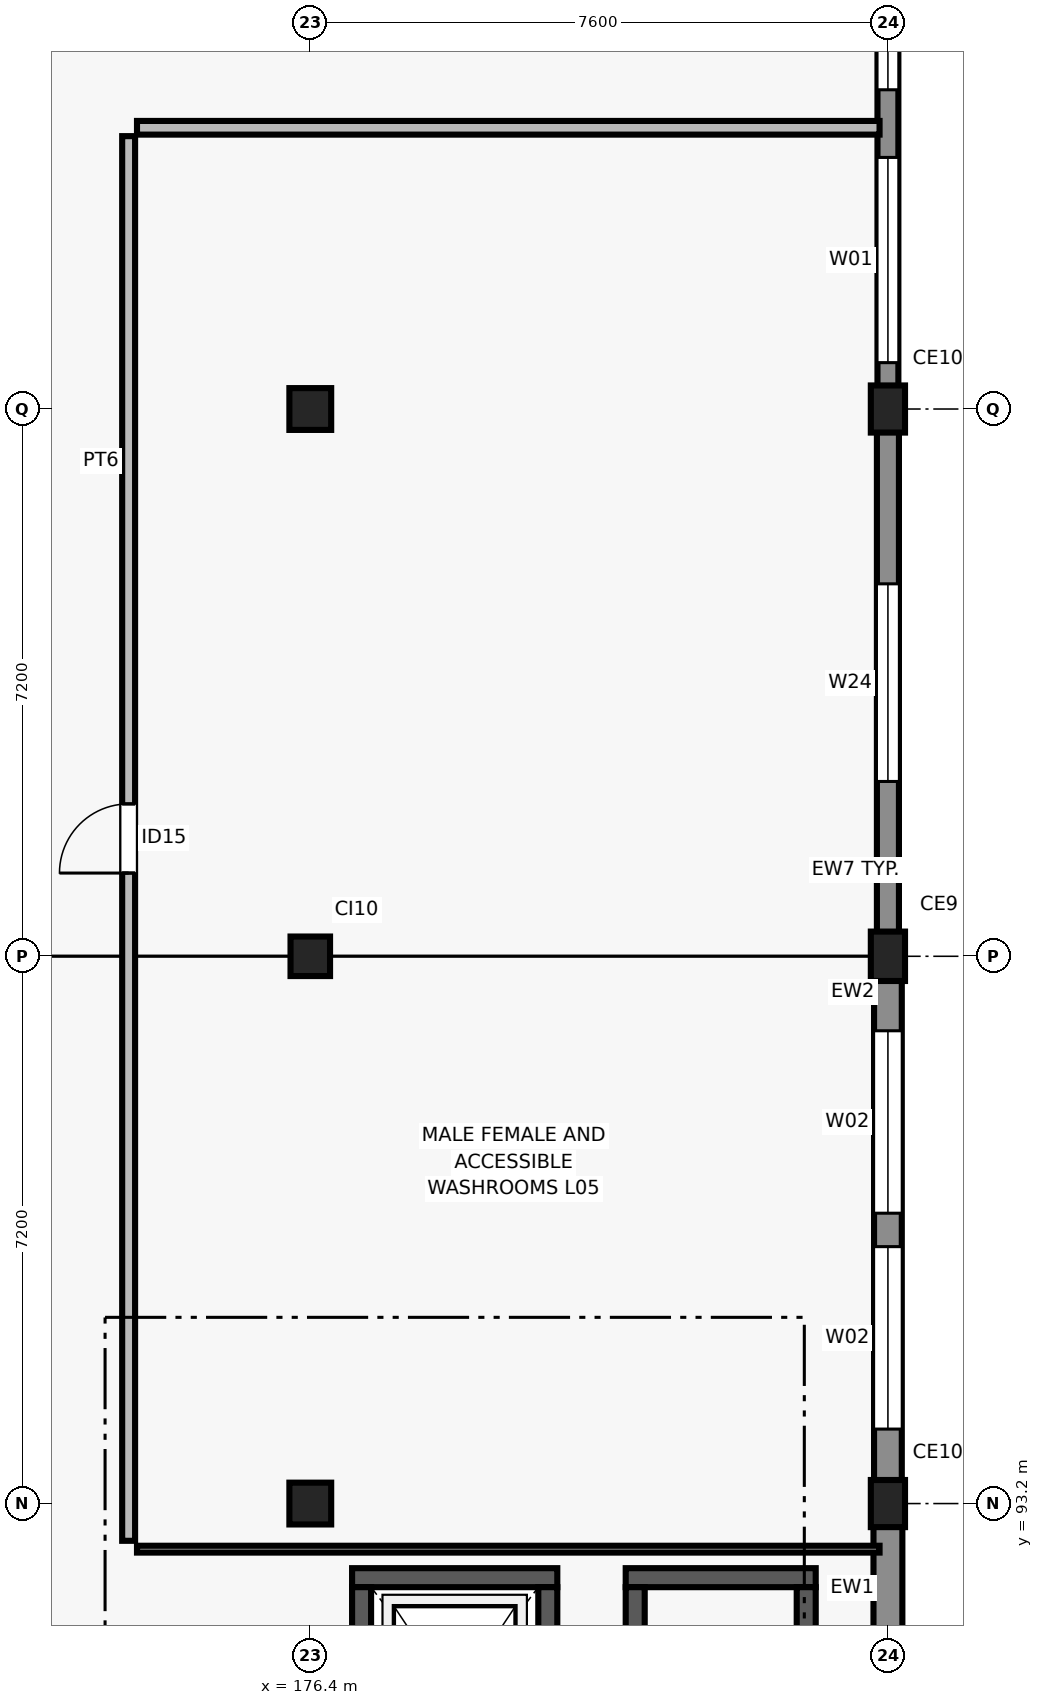
"""IFC4 building model, lengths in metres.
Left out: names, types, materials, properties, quantities, classifications, styles, units other than length and angle.
Written with IfcOpenShell. Run it as: python <this file> out.ifc"""

import sys

from ifc_helpers import new_model, si_unit, direction, frame, frame_2d, origin, origin_2d, place, context, subcontext, project, spatial, rectangle, extrude, element, fill, save


model = new_model("IFC4")
c1 = context("Model", 3, precision=1e-05, world=origin(), true_north=direction((0.0, 1.0)))
c2 = subcontext(c1, "Body", "Model", "MODEL_VIEW")
j1 = project(units=[si_unit("LENGTHUNIT", "METRE"), si_unit("PLANEANGLEUNIT", "RADIAN")], contexts=[c1])
p1 = place(None, origin())
s1 = spatial("IfcSite", under=j1, at=p1, CompositionType="ELEMENT")
p2 = place(p1, origin())
s2 = spatial("IfcBuilding", under=s1, at=p2, CompositionType="ELEMENT")
p3 = place(p2, frame((0.0, 0.0, 21.6)))
s3 = spatial("IfcBuildingStorey", under=s2, at=p3, CompositionType="ELEMENT", Elevation=21.6)
p4 = place(p3, frame((176.4, 93.2, 0.0), z_axis=(0.0, 0.0, 1.0), x_axis=(1.0, 0.0, 0.0)))
e1 = element("IfcColumn", 1, at=p4, inside=s3, PredefinedType="COLUMN", context=c2, shape_type="SweptSolid", body=[
    extrude(rectangle(XDim=0.55, YDim=0.55, at=origin_2d()), origin(), (0.0, 0.0, 1.0), 4.2),
])
p5 = place(p3, frame((176.4, 100.4, 0.0), z_axis=(0.0, 0.0, 1.0), x_axis=(1.0, 0.0, 0.0)))
e2 = element("IfcColumn", 2, at=p5, inside=s3, PredefinedType="COLUMN", context=c2, shape_type="SweptSolid", body=[
    extrude(rectangle(XDim=0.52, YDim=0.52, at=origin_2d()), origin(), (0.0, 0.0, 1.0), 4.2),
])
p6 = place(p3, frame((176.4, 107.6, 0.0), z_axis=(0.0, 0.0, 1.0), x_axis=(1.0, 0.0, 0.0)))
e3 = element("IfcColumn", 3, at=p6, inside=s3, PredefinedType="COLUMN", context=c2, shape_type="SweptSolid", body=[
    extrude(rectangle(XDim=0.55, YDim=0.55, at=origin_2d()), origin(), (0.0, 0.0, 1.0), 4.2),
])
p7 = place(p3, frame((184.0, 93.2, 0.0), z_axis=(0.0, 0.0, 1.0), x_axis=(1.0, 0.0, 0.0)))
e4 = element("IfcColumn", 4, at=p7, inside=s3, PredefinedType="COLUMN", context=c2, shape_type="SweptSolid", body=[
    extrude(rectangle(XDim=0.62, YDim=0.45, at=origin_2d()), origin(), (0.0, 0.0, 1.0), 4.2),
])
p8 = place(p3, frame((184.0, 100.4, 0.0), z_axis=(0.0, 0.0, 1.0), x_axis=(1.0, 0.0, 0.0)))
e5 = element("IfcColumn", 5, at=p8, inside=s3, PredefinedType="COLUMN", context=c2, shape_type="SweptSolid", body=[
    extrude(rectangle(XDim=0.65, YDim=0.45, at=origin_2d()), origin(), (0.0, 0.0, 1.0), 4.2),
])
p9 = place(p3, frame((184.0, 107.6, 0.0), z_axis=(0.0, 0.0, 1.0), x_axis=(1.0, 0.0, 0.0)))
e6 = element("IfcColumn", 6, at=p9, inside=s3, PredefinedType="COLUMN", context=c2, shape_type="SweptSolid", body=[
    extrude(rectangle(XDim=0.62, YDim=0.45, at=origin_2d()), origin(), (0.0, 0.0, 1.0), 4.2),
])
p10 = place(p3, frame((184.0, 100.62, 0.0), z_axis=(0.0, 0.0, 1.0), x_axis=(0.0, 1.0, 0.0)))
e7 = element("IfcWall", 7, at=p10, inside=s3, PredefinedType="SOLIDWALL", context=c2, shape_type="SweptSolid", body=[
    extrude(rectangle(XDim=6.76, YDim=0.29, at=frame_2d((3.38, 0.0))), origin(), (0.0, 0.0, 1.0), 3.46),
])
p11 = place(p10, frame((2.08, 0.0, 0.9)))
e8 = element("IfcOpeningElement", 8, at=p11, cuts=e7, PredefinedType="OPENING", context=c2, shape_type="SweptSolid", body=[
    extrude(rectangle(XDim=2.6, YDim=1.65, at=frame_2d((1.3, 0.825))), frame((0.0, 0.155, 0.0), z_axis=(0.0, -1.0, 0.0), x_axis=(1.0, 0.0, 0.0)), (0.0, 0.0, 1.0), 0.31),
])
p12 = place(p3, frame((184.0, 107.82, 0.0), z_axis=(0.0, 0.0, 1.0), x_axis=(0.0, 1.0, 0.0)))
e9 = element("IfcWall", 9, at=p12, inside=s3, PredefinedType="SOLIDWALL", context=c2, shape_type="SweptSolid", body=[
    extrude(rectangle(XDim=6.76, YDim=0.275, at=frame_2d((3.38, 0.0))), origin(), (0.0, 0.0, 1.0), 3.52),
])
p13 = place(p12, frame((0.39, 0.0, 0.9)))
e10 = element("IfcOpeningElement", 10, at=p13, cuts=e9, PredefinedType="OPENING", context=c2, shape_type="SweptSolid", body=[
    extrude(rectangle(XDim=2.7, YDim=1.8, at=frame_2d((1.35, 0.9))), frame((0.0, 0.147, 0.0), z_axis=(0.0, -1.0, 0.0), x_axis=(1.0, 0.0, 0.0)), (0.0, 0.0, 1.0), 0.295),
])
p14 = place(p12, frame((3.98, 0.0, 0.9)))
e11 = element("IfcOpeningElement", 11, at=p14, cuts=e9, PredefinedType="OPENING", context=c2, shape_type="SweptSolid", body=[
    extrude(rectangle(XDim=1.8, YDim=1.8, at=frame_2d((0.9, 0.9))), frame((0.0, 0.147, 0.0), z_axis=(0.0, -1.0, 0.0), x_axis=(1.0, 0.0, 0.0)), (0.0, 0.0, 1.0), 0.295),
])
p15 = place(p3, frame((184.0, 86.22, 0.0), z_axis=(0.0, 0.0, 1.0), x_axis=(0.0, 1.0, 0.0)))
e12 = element("IfcWall", 12, at=p15, inside=s3, PredefinedType="SOLIDWALL", context=c2, shape_type="SweptSolid", body=[
    extrude(rectangle(XDim=6.76, YDim=0.38, at=frame_2d((3.38, 0.0))), origin(), (0.0, 0.0, 1.0), 3.36),
])
p16 = place(p15, frame((2.03, 0.0, 0.9)))
e13 = element("IfcOpeningElement", 13, at=p16, cuts=e12, PredefinedType="OPENING", context=c2, shape_type="SweptSolid", body=[
    extrude(rectangle(XDim=2.7, YDim=1.8, at=frame_2d((1.35, 0.9))), frame((0.0, 0.2, 0.0), z_axis=(0.0, -1.0, 0.0), x_axis=(1.0, 0.0, 0.0)), (0.0, 0.0, 1.0), 0.4),
])
p17 = place(p3, frame((184.0, 93.42, 0.0), z_axis=(0.0, 0.0, 1.0), x_axis=(0.0, 1.0, 0.0)))
e14 = element("IfcWall", 14, at=p17, inside=s3, PredefinedType="SOLIDWALL", context=c2, shape_type="SweptSolid", body=[
    extrude(rectangle(XDim=6.76, YDim=0.365, at=frame_2d((3.38, 0.0))), origin(), (0.0, 0.0, 1.0), 3.4),
])
p18 = place(p17, frame((0.76, 0.0, 0.9)))
e15 = element("IfcOpeningElement", 15, at=p18, cuts=e14, PredefinedType="OPENING", context=c2, shape_type="SweptSolid", body=[
    extrude(rectangle(XDim=2.4, YDim=1.8, at=frame_2d((1.2, 0.9))), frame((0.0, 0.192, 0.0), z_axis=(0.0, -1.0, 0.0), x_axis=(1.0, 0.0, 0.0)), (0.0, 0.0, 1.0), 0.385),
])
p19 = place(p17, frame((3.6, 0.0, 0.9)))
e16 = element("IfcOpeningElement", 16, at=p19, cuts=e14, PredefinedType="OPENING", context=c2, shape_type="SweptSolid", body=[
    extrude(rectangle(XDim=2.4, YDim=1.8, at=frame_2d((1.2, 0.9))), frame((0.0, 0.192, 0.0), z_axis=(0.0, -1.0, 0.0), x_axis=(1.0, 0.0, 0.0)), (0.0, 0.0, 1.0), 0.385),
])
p20 = place(p3, frame((176.95, 92.225, 0.0), z_axis=(0.0, 0.0, 1.0), x_axis=(1.0, 0.0, 0.0)))
e17 = element("IfcWall", 17, at=p20, inside=s3, PredefinedType="SHEAR", context=c2, shape_type="SweptSolid", body=[
    extrude(rectangle(XDim=2.7, YDim=0.25, at=frame_2d((1.35, 0.0))), origin(), (0.0, 0.0, 1.0), 3.92),
])
for number, where, z_axis, x_axis in (
    (18, (177.075, 89.2, 0.0), (0.0, 0.0, 1.0), (0.0, 1.0, 0.0)),
    (19, (179.525, 89.2, 0.0), (0.0, 0.0, 1.0), (0.0, 1.0, 0.0)),
):
    element("IfcWall", number, at=place(p3, frame(where, z_axis=z_axis, x_axis=x_axis)), inside=s3, PredefinedType="SHEAR", context=c2, shape_type="SweptSolid", body=[
        extrude(rectangle(XDim=2.9, YDim=0.25, at=frame_2d((1.45, 0.0))), origin(), (0.0, 0.0, 1.0), 3.92),
    ])
p21 = place(p3, frame((180.55, 92.225, 0.0), z_axis=(0.0, 0.0, 1.0), x_axis=(1.0, 0.0, 0.0)))
e20 = element("IfcWall", 20, at=p21, inside=s3, PredefinedType="SHEAR", context=c2, shape_type="SweptSolid", body=[
    extrude(rectangle(XDim=2.5, YDim=0.25, at=frame_2d((1.25, 0.0))), origin(), (0.0, 0.0, 1.0), 3.92),
])
for number, where, z_axis, x_axis in (
    (21, (180.675, 89.2, 0.0), (0.0, 0.0, 1.0), (0.0, 1.0, 0.0)),
    (22, (182.925, 89.2, 0.0), (0.0, 0.0, 1.0), (0.0, 1.0, 0.0)),
):
    element("IfcWall", number, at=place(p3, frame(where, z_axis=z_axis, x_axis=x_axis)), inside=s3, PredefinedType="SHEAR", context=c2, shape_type="SweptSolid", body=[
        extrude(rectangle(XDim=2.9, YDim=0.25, at=frame_2d((1.45, 0.0))), origin(), (0.0, 0.0, 1.0), 3.92),
    ])
p22 = place(p3, frame((174.12, 92.6, 0.0), z_axis=(0.0, 0.0, 1.0), x_axis=(1.0, 0.0, 0.0)))
e23 = element("IfcWall", 23, at=p22, inside=s3, PredefinedType="PARTITIONING", context=c2, shape_type="SweptSolid", body=[
    extrude(rectangle(XDim=9.77, YDim=0.09, at=frame_2d((4.885, 0.0))), origin(), (0.0, 0.0, 1.0), 3.9),
])
p23 = place(p3, frame((174.12, 111.3, 0.0), z_axis=(0.0, 0.0, 1.0), x_axis=(1.0, 0.0, 0.0)))
e24 = element("IfcWall", 24, at=p23, inside=s3, PredefinedType="PARTITIONING", context=c2, shape_type="SweptSolid", body=[
    extrude(rectangle(XDim=9.77, YDim=0.18, at=frame_2d((4.885, 0.0))), origin(), (0.0, 0.0, 1.0), 3.9),
])
p24 = place(p3, frame((174.01, 92.71, 0.0), z_axis=(0.0, 0.0, 1.0), x_axis=(0.0, 1.0, 0.0)))
e25 = element("IfcWall", 25, at=p24, inside=s3, PredefinedType="PARTITIONING", context=c2, shape_type="SweptSolid", body=[
    extrude(rectangle(XDim=18.48, YDim=0.17, at=frame_2d((9.24, 0.0))), origin(), (0.0, 0.0, 1.0), 3.9),
])
p25 = place(p24, frame((8.785, 0.0, 0.0)))
e26 = element("IfcOpeningElement", 26, at=p25, cuts=e25, PredefinedType="OPENING", context=c2, shape_type="SweptSolid", body=[
    extrude(rectangle(XDim=0.91, YDim=2.1, at=frame_2d((0.455, 1.05))), frame((0.0, 0.095, 0.0), z_axis=(0.0, -1.0, 0.0), x_axis=(1.0, 0.0, 0.0)), (0.0, 0.0, 1.0), 0.19),
])
p26 = place(p11, origin())
e27 = element("IfcWindow", 27, at=p26, inside=s3, PartitioningType="SINGLE_PANEL", PredefinedType="WINDOW", context=c2, shape_type="SweptSolid", body=[
    extrude(rectangle(XDim=2.6, YDim=1.65, at=frame_2d((1.3, 0.825))), frame((0.0, 0.03, 0.0), z_axis=(0.0, -1.0, 0.0), x_axis=(1.0, 0.0, 0.0)), (0.0, 0.0, 1.0), 0.06),
])
fill(e8, e27)
p27 = place(p13, origin())
e28 = element("IfcWindow", 28, at=p27, inside=s3, PartitioningType="SINGLE_PANEL", PredefinedType="WINDOW", context=c2, shape_type="SweptSolid", body=[
    extrude(rectangle(XDim=2.7, YDim=1.8, at=frame_2d((1.35, 0.9))), frame((0.0, 0.03, 0.0), z_axis=(0.0, -1.0, 0.0), x_axis=(1.0, 0.0, 0.0)), (0.0, 0.0, 1.0), 0.06),
])
fill(e10, e28)
p28 = place(p14, origin())
e29 = element("IfcWindow", 29, at=p28, inside=s3, PartitioningType="SINGLE_PANEL", PredefinedType="WINDOW", context=c2, shape_type="SweptSolid", body=[
    extrude(rectangle(XDim=1.8, YDim=1.8, at=frame_2d((0.9, 0.9))), frame((0.0, 0.03, 0.0), z_axis=(0.0, -1.0, 0.0), x_axis=(1.0, 0.0, 0.0)), (0.0, 0.0, 1.0), 0.06),
])
fill(e11, e29)
p29 = place(p18, origin())
e30 = element("IfcWindow", 30, at=p29, inside=s3, PartitioningType="SINGLE_PANEL", PredefinedType="WINDOW", context=c2, shape_type="SweptSolid", body=[
    extrude(rectangle(XDim=2.4, YDim=1.8, at=frame_2d((1.2, 0.9))), frame((0.0, 0.03, 0.0), z_axis=(0.0, -1.0, 0.0), x_axis=(1.0, 0.0, 0.0)), (0.0, 0.0, 1.0), 0.06),
])
fill(e15, e30)
p30 = place(p19, origin())
e31 = element("IfcWindow", 31, at=p30, inside=s3, PartitioningType="SINGLE_PANEL", PredefinedType="WINDOW", context=c2, shape_type="SweptSolid", body=[
    extrude(rectangle(XDim=2.4, YDim=1.8, at=frame_2d((1.2, 0.9))), frame((0.0, 0.03, 0.0), z_axis=(0.0, -1.0, 0.0), x_axis=(1.0, 0.0, 0.0)), (0.0, 0.0, 1.0), 0.06),
])
fill(e16, e31)
p31 = place(p25, origin())
e32 = element("IfcDoor", 32, at=p31, inside=s3, OperationType="SINGLE_SWING_LEFT", PredefinedType="DOOR", context=c2, shape_type="SweptSolid", body=[
    extrude(rectangle(XDim=0.91, YDim=2.1, at=frame_2d((0.455, 1.05))), frame((0.0, 0.025, 0.0), z_axis=(0.0, -1.0, 0.0), x_axis=(1.0, 0.0, 0.0)), (0.0, 0.0, 1.0), 0.05),
])
fill(e26, e32)
save(model, sys.argv[1])
